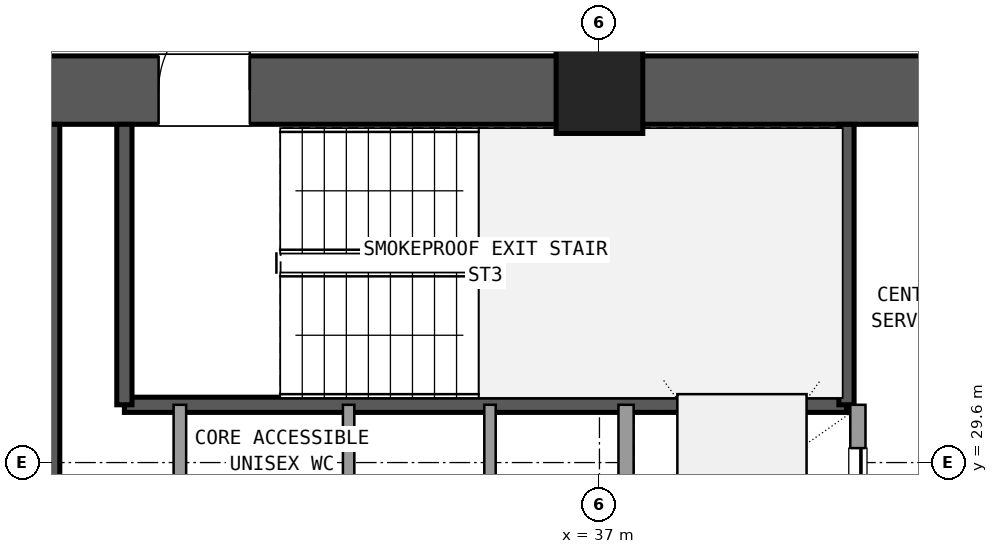
"""IFC4 building model, lengths in metres.
Left out: names, types, materials, properties, quantities, classifications, styles, units other than length and angle.
Written with IfcOpenShell. Run it as: python <this file> out.ifc"""

import sys

from ifc_helpers import new_model, si_unit, direction, frame, frame_2d, origin, origin_2d, place, context, subcontext, project, spatial, rectangle, extrude, element, fill, save


model = new_model("IFC4")
c1 = context("Model", 3, precision=1e-05, world=origin(), true_north=direction((0.0, 1.0)))
c2 = subcontext(c1, "Body", "Model", "MODEL_VIEW")
j1 = project(units=[si_unit("LENGTHUNIT", "METRE"), si_unit("PLANEANGLEUNIT", "RADIAN")], contexts=[c1])
p1 = place(None, origin())
s1 = spatial("IfcSite", under=j1, at=p1, CompositionType="ELEMENT")
p2 = place(p1, origin())
s2 = spatial("IfcBuilding", under=s1, at=p2, CompositionType="ELEMENT")
p3 = place(p2, frame((0.0, 0.0, 52.74)))
s3 = spatial("IfcBuildingStorey", under=s2, at=p3, CompositionType="ELEMENT", Elevation=52.74)
p4 = place(p3, frame((37.0, 34.5, 0.0), z_axis=(0.0, 0.0, 1.0), x_axis=(1.0, 0.0, 0.0)))
e1 = element("IfcColumn", 1, at=p4, inside=s3, PredefinedType="COLUMN", context=c2, shape_type="SweptSolid", body=[
    extrude(rectangle(XDim=1.14, YDim=1.14, at=origin_2d()), origin(), (0.0, 0.0, 1.0), 3.6),
])
p5 = place(p3, frame((47.635, 34.5, 0.0), z_axis=(0.0, 0.0, 1.0), x_axis=(-1.0, 0.0, 0.0)))
e2 = element("IfcWall", 2, at=p5, inside=s3, PredefinedType="SHEAR", context=c2, shape_type="SweptSolid", body=[
    extrude(rectangle(XDim=10.07, YDim=0.9, at=frame_2d((5.035, 0.0))), origin(), (0.0, 0.0, 1.0), 3.32),
])
p6 = place(p5, frame((4.535, 0.0, 0.0)))
e3 = element("IfcOpeningElement", 3, at=p6, cuts=e2, PredefinedType="OPENING", context=c2, shape_type="SweptSolid", body=[
    extrude(rectangle(XDim=1.6, YDim=2.2, at=frame_2d((0.8, 1.1))), frame((0.0, 0.46, 0.0), z_axis=(0.0, -1.0, 0.0), x_axis=(1.0, 0.0, 0.0)), (0.0, 0.0, 1.0), 0.92),
])
p7 = place(p3, frame((36.435, 34.5, 0.0), z_axis=(0.0, 0.0, 1.0), x_axis=(-1.0, 0.0, 0.0)))
e4 = element("IfcWall", 4, at=p7, inside=s3, PredefinedType="SHEAR", context=c2, shape_type="SweptSolid", body=[
    extrude(rectangle(XDim=10.07, YDim=0.9, at=frame_2d((5.035, 0.0))), origin(), (0.0, 0.0, 1.0), 3.32),
])
p8 = place(p7, frame((4.035, 0.0, 0.0)))
e5 = element("IfcOpeningElement", 5, at=p8, cuts=e4, PredefinedType="OPENING", context=c2, shape_type="SweptSolid", body=[
    extrude(rectangle(XDim=1.2, YDim=2.15, at=frame_2d((0.6, 1.075))), frame((0.0, 0.46, 0.0), z_axis=(0.0, -1.0, 0.0), x_axis=(1.0, 0.0, 0.0)), (0.0, 0.0, 1.0), 0.92),
])
p9 = place(p3, frame((29.8, 24.65, 0.0), z_axis=(0.0, 0.0, 1.0), x_axis=(0.0, 1.0, 0.0)))
e6 = element("IfcWall", 6, at=p9, inside=s3, PredefinedType="SHEAR", context=c2, shape_type="SweptSolid", body=[
    extrude(rectangle(XDim=9.4, YDim=0.2, at=frame_2d((4.7, 0.0))), origin(), (0.0, 0.0, 1.0), 3.32),
])
p10 = place(p3, frame((30.75, 30.36, 0.0), z_axis=(0.0, 0.0, 1.0), x_axis=(1.0, 0.0, 0.0)))
e7 = element("IfcWall", 7, at=p10, inside=s3, PredefinedType="SHEAR", context=c2, shape_type="SweptSolid", body=[
    extrude(rectangle(XDim=9.5, YDim=0.2, at=frame_2d((4.75, 0.0))), origin(), (0.0, 0.0, 1.0), 3.32),
])
for number, where, z_axis, x_axis in (
    (8, (30.75, 30.36, 0.0), (0.0, 0.0, 1.0), (0.0, 1.0, 0.0)),
    (9, (40.25, 30.36, 0.0), (0.0, 0.0, 1.0), (0.0, 1.0, 0.0)),
):
    element("IfcWall", number, at=place(p3, frame(where, z_axis=z_axis, x_axis=x_axis)), inside=s3, PredefinedType="SHEAR", context=c2, shape_type="SweptSolid", body=[
        extrude(rectangle(XDim=3.69, YDim=0.2, at=frame_2d((1.845, 0.0))), origin(), (0.0, 0.0, 1.0), 3.32),
    ])
p11 = place(p3, frame((37.35, 23.54, 0.0), z_axis=(0.0, 0.0, 1.0), x_axis=(0.0, 1.0, 0.0)))
e10 = element("IfcWall", 10, at=p11, inside=s3, PredefinedType="SOLIDWALL", context=c2, shape_type="SweptSolid", body=[
    extrude(rectangle(XDim=6.82, YDim=0.2, at=frame_2d((3.41, 0.0))), origin(), (0.0, 0.0, 1.0), 2.61),
])
p12 = place(p3, frame((40.4, 23.54, 0.0), z_axis=(0.0, 0.0, 1.0), x_axis=(0.0, 1.0, 0.0)))
e11 = element("IfcWall", 11, at=p12, inside=s3, PredefinedType="SOLIDWALL", context=c2, shape_type="SweptSolid", body=[
    extrude(rectangle(XDim=6.82, YDim=0.2, at=frame_2d((3.41, 0.0))), origin(), (0.0, 0.0, 1.0), 2.61),
])
p13 = place(p12, frame((0.35, 0.0, 0.0)))
e12 = element("IfcOpeningElement", 12, at=p13, cuts=e11, PredefinedType="OPENING", context=c2, shape_type="SweptSolid", body=[
    extrude(rectangle(XDim=1.4, YDim=2.2, at=frame_2d((0.7, 1.1))), frame((0.0, 0.11, 0.0), z_axis=(0.0, -1.0, 0.0), x_axis=(1.0, 0.0, 0.0)), (0.0, 0.0, 1.0), 0.22),
])
p14 = place(p12, frame((2.65, 0.0, 0.0)))
e13 = element("IfcOpeningElement", 13, at=p14, cuts=e11, PredefinedType="OPENING", context=c2, shape_type="SweptSolid", body=[
    extrude(rectangle(XDim=1.4, YDim=2.2, at=frame_2d((0.7, 1.1))), frame((0.0, 0.11, 0.0), z_axis=(0.0, -1.0, 0.0), x_axis=(1.0, 0.0, 0.0)), (0.0, 0.0, 1.0), 0.22),
])
p15 = place(p12, frame((4.85, 0.0, 0.0)))
e14 = element("IfcOpeningElement", 14, at=p15, cuts=e11, PredefinedType="OPENING", context=c2, shape_type="SweptSolid", body=[
    extrude(rectangle(XDim=1.4, YDim=2.2, at=frame_2d((0.7, 1.1))), frame((0.0, 0.11, 0.0), z_axis=(0.0, -1.0, 0.0), x_axis=(1.0, 0.0, 0.0)), (0.0, 0.0, 1.0), 0.22),
])
p16 = place(p3, frame((31.48, 26.32, 0.0), z_axis=(0.0, 0.0, 1.0), x_axis=(0.0, 1.0, 0.0)))
e15 = element("IfcWall", 15, at=p16, inside=s3, PredefinedType="PLUMBINGWALL", context=c2, shape_type="SweptSolid", body=[
    extrude(rectangle(XDim=4.04, YDim=0.165, at=frame_2d((2.02, 0.0))), origin(), (0.0, 0.0, 1.0), 2.61),
])
p17 = place(p16, frame((0.22, 0.0, 0.0)))
e16 = element("IfcOpeningElement", 16, at=p17, cuts=e15, PredefinedType="OPENING", context=c2, shape_type="SweptSolid", body=[
    extrude(rectangle(XDim=1.0, YDim=2.15, at=frame_2d((0.5, 1.075))), frame((0.0, 0.093, 0.0), z_axis=(0.0, -1.0, 0.0), x_axis=(1.0, 0.0, 0.0)), (0.0, 0.0, 1.0), 0.185),
])
for number, where, z_axis, x_axis in (
    (17, (33.7, 27.8, 0.0), (0.0, 0.0, 1.0), (0.0, 1.0, 0.0)),
    (18, (35.56, 27.8, 0.0), (0.0, 0.0, 1.0), (0.0, 1.0, 0.0)),
):
    element("IfcWall", number, at=place(p3, frame(where, z_axis=z_axis, x_axis=x_axis)), inside=s3, PredefinedType="PARTITIONING", context=c2, shape_type="SweptSolid", body=[
        extrude(rectangle(XDim=2.56, YDim=0.15, at=frame_2d((1.28, 0.0))), origin(), (0.0, 0.0, 1.0), 2.61),
    ])
p18 = place(p3, frame((37.0, 34.95, 0.0), z_axis=(0.0, 0.0, 1.0), x_axis=(0.0, 1.0, 0.0)))
e19 = element("IfcWall", 19, at=p18, inside=s3, PredefinedType="PARTITIONING", context=c2, shape_type="SweptSolid", body=[
    extrude(rectangle(XDim=2.7, YDim=0.18, at=frame_2d((1.35, 0.0))), origin(), (0.0, 0.0, 1.0), 2.61),
])
p19 = place(p18, frame((0.35, 0.0, 0.0)))
e20 = element("IfcOpeningElement", 20, at=p19, cuts=e19, PredefinedType="OPENING", context=c2, shape_type="SweptSolid", body=[
    extrude(rectangle(XDim=2.0, YDim=2.2, at=frame_2d((1.0, 1.1))), frame((0.0, 0.1, 0.0), z_axis=(0.0, -1.0, 0.0), x_axis=(1.0, 0.0, 0.0)), (0.0, 0.0, 1.0), 0.2),
])
p20 = place(p8, frame((1.2, 0.0, 0.0), z_axis=(0.0, 0.0, 1.0), x_axis=(-1.0, 0.0, 0.0)))
e21 = element("IfcDoor", 21, at=p20, inside=s3, OperationType="SINGLE_SWING_LEFT", PredefinedType="DOOR", context=c2, shape_type="SweptSolid", body=[
    extrude(rectangle(XDim=1.2, YDim=2.15, at=frame_2d((0.6, 1.075))), frame((0.0, 0.025, 0.0), z_axis=(0.0, -1.0, 0.0), x_axis=(1.0, 0.0, 0.0)), (0.0, 0.0, 1.0), 0.05),
])
fill(e5, e21)
p21 = place(p15, origin())
e22 = element("IfcDoor", 22, at=p21, inside=s3, OperationType="SLIDING_TO_RIGHT", PredefinedType="DOOR", context=c2, shape_type="SweptSolid", body=[
    extrude(rectangle(XDim=1.4, YDim=2.2, at=frame_2d((0.7, 1.1))), frame((0.0, 0.025, 0.0), z_axis=(0.0, -1.0, 0.0), x_axis=(1.0, 0.0, 0.0)), (0.0, 0.0, 1.0), 0.05),
])
fill(e14, e22)
save(model, sys.argv[1])
